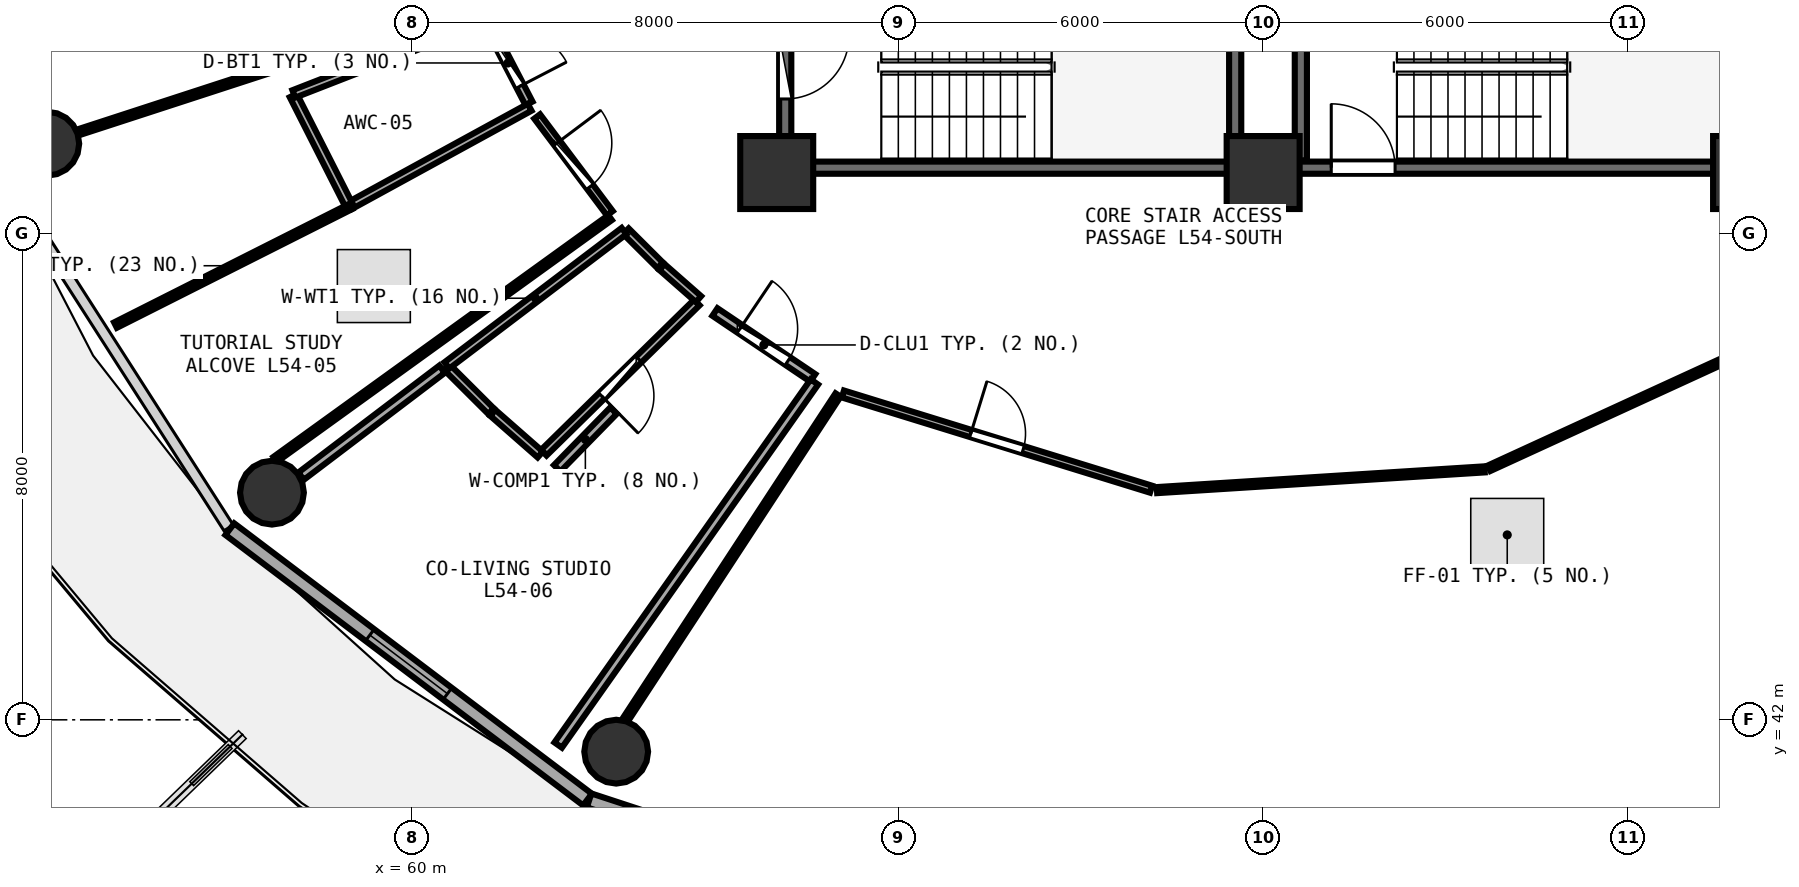
"""IFC4 building model, lengths in metres.
Left out: names, types, materials, properties, quantities, classifications, styles, units other than length and angle.
Written with IfcOpenShell. Run it as: python <this file> out.ifc"""

import sys

from ifc_helpers import new_model, si_unit, direction, frame, frame_2d, origin, origin_2d, place, context, subcontext, project, spatial, rectangle, circle, extrude, element, fill, save


model = new_model("IFC4")
c1 = context("Model", 3, precision=1e-05, world=origin(), true_north=direction((0.0, 1.0)))
c2 = subcontext(c1, "Body", "Model", "MODEL_VIEW")
j1 = project(units=[si_unit("LENGTHUNIT", "METRE"), si_unit("PLANEANGLEUNIT", "RADIAN")], contexts=[c1])
p1 = place(None, origin())
s1 = spatial("IfcSite", under=j1, at=p1, CompositionType="ELEMENT")
p2 = place(p1, origin())
s2 = spatial("IfcBuilding", under=s1, at=p2, CompositionType="ELEMENT")
p3 = place(p2, frame((0.0, 0.0, 211.95)))
s3 = spatial("IfcBuildingStorey", under=s2, at=p3, CompositionType="ELEMENT", Elevation=211.95)
for number, where, z_axis, x_axis in (
    (1, (66.0, 51.0, 0.0), (0.0, 0.0, 1.0), (1.0, 0.0, 0.0)),
    (2, (74.0, 51.0, 0.0), (0.0, 0.0, 1.0), (1.0, 0.0, 0.0)),
    (3, (82.0, 51.0, 0.0), (0.0, 0.0, 1.0), (1.0, 0.0, 0.0)),
):
    element("IfcColumn", number, at=place(p3, frame(where, z_axis=z_axis, x_axis=x_axis)), inside=s3, PredefinedType="PILASTER", context=c2, shape_type="SweptSolid", body=[
        extrude(rectangle(XDim=1.2, YDim=1.2, at=origin_2d()), origin(), (0.0, 0.0, 1.0), 3.75),
    ])
for number, where, z_axis, x_axis in (
    (4, (54.003, 51.474, 0.0), (0.0, 0.0, 1.0), (1.0, 0.0, 0.0)),
    (5, (57.698, 45.736, 0.0), (0.0, 0.0, 1.0), (1.0, 0.0, 0.0)),
    (6, (63.36, 41.476, 0.0), (0.0, 0.0, 1.0), (1.0, 0.0, 0.0)),
):
    element("IfcColumn", number, at=place(p3, frame(where, z_axis=z_axis, x_axis=x_axis)), inside=s3, PredefinedType="COLUMN", context=c2, shape_type="SweptSolid", body=[
        extrude(circle(Radius=0.525, at=origin_2d()), origin(), (0.0, 0.0, 1.0), 3.75),
    ])
p4 = place(p3, frame((57.006, 45.135, 0.0), z_axis=(0.0, 0.0, 1.0), x_axis=(0.797701674595, -0.603052268338, 0.0)))
e7 = element("IfcWall", 7, at=p4, inside=s3, PredefinedType="SOLIDWALL", context=c2, shape_type="SweptSolid", body=[
    extrude(rectangle(XDim=7.374, YDim=0.24, at=frame_2d((3.687, 0.0))), origin(), (0.0, 0.0, 1.0), 3.475),
])
p5 = place(p4, frame((2.887, 0.0, 0.85)))
e8 = element("IfcOpeningElement", 8, at=p5, cuts=e7, PredefinedType="OPENING", context=c2, shape_type="SweptSolid", body=[
    extrude(rectangle(XDim=1.6, YDim=1.45, at=frame_2d((0.8, 0.725))), frame((0.0, 0.13, 0.0), z_axis=(0.0, -1.0, 0.0), x_axis=(1.0, 0.0, 0.0)), (0.0, 0.0, 1.0), 0.26),
])
p6 = place(p3, frame((62.914, 40.675, 0.0), z_axis=(0.0, 0.0, 1.0), x_axis=(0.95022142767, -0.31157541366, 0.0)))
e9 = element("IfcWall", 9, at=p6, inside=s3, PredefinedType="SOLIDWALL", context=c2, shape_type="SweptSolid", body=[
    extrude(rectangle(XDim=7.594, YDim=0.24, at=frame_2d((3.797, 0.0))), origin(), (0.0, 0.0, 1.0), 3.475),
])
p7 = place(p6, frame((2.997, 0.0, 0.85)))
e10 = element("IfcOpeningElement", 10, at=p7, cuts=e9, PredefinedType="OPENING", context=c2, shape_type="SweptSolid", body=[
    extrude(rectangle(XDim=1.6, YDim=1.45, at=frame_2d((0.8, 0.725))), frame((0.0, 0.13, 0.0), z_axis=(0.0, -1.0, 0.0), x_axis=(1.0, 0.0, 0.0)), (0.0, 0.0, 1.0), 0.26),
])
p8 = place(p3, frame((74.0, 51.08, 0.0), z_axis=(0.0, 0.0, 1.0), x_axis=(1.0, 0.0, 0.0)))
e11 = element("IfcWall", 11, at=p8, inside=s3, PredefinedType="SHEAR", context=c2, shape_type="SweptSolid", body=[
    extrude(rectangle(XDim=7.9, YDim=0.2, at=frame_2d((3.95, 0.0))), origin(), (0.0, 0.0, 1.0), 3.49),
])
p9 = place(p8, frame((1.12, 0.0, 0.0)))
e12 = element("IfcOpeningElement", 12, at=p9, cuts=e11, PredefinedType="OPENING", context=c2, shape_type="SweptSolid", body=[
    extrude(rectangle(XDim=1.05, YDim=2.1, at=frame_2d((0.525, 1.05))), frame((0.0, 0.11, 0.0), z_axis=(0.0, -1.0, 0.0), x_axis=(1.0, 0.0, 0.0)), (0.0, 0.0, 1.0), 0.22),
])
p10 = place(p3, frame((74.62, 54.27, 0.0), z_axis=(0.0, 0.0, 1.0), x_axis=(0.0, -1.0, 0.0)))
e13 = element("IfcWall", 13, at=p10, inside=s3, PredefinedType="SHEAR", context=c2, shape_type="SweptSolid", body=[
    extrude(rectangle(XDim=3.07, YDim=0.2, at=frame_2d((1.535, 0.0))), origin(), (0.0, 0.0, 1.0), 3.49),
])
p11 = place(p3, frame((66.26, 51.08, 0.0), z_axis=(0.0, 0.0, 1.0), x_axis=(1.0, 0.0, 0.0)))
e14 = element("IfcWall", 14, at=p11, inside=s3, PredefinedType="SHEAR", context=c2, shape_type="SweptSolid", body=[
    extrude(rectangle(XDim=7.16, YDim=0.2, at=frame_2d((3.58, 0.0))), origin(), (0.0, 0.0, 1.0), 3.49),
])
p12 = place(p3, frame((73.54, 51.2, 0.0), z_axis=(0.0, 0.0, 1.0), x_axis=(0.0, 1.0, 0.0)))
e15 = element("IfcWall", 15, at=p12, inside=s3, PredefinedType="SHEAR", context=c2, shape_type="SweptSolid", body=[
    extrude(rectangle(XDim=3.07, YDim=0.2, at=frame_2d((1.535, 0.0))), origin(), (0.0, 0.0, 1.0), 3.49),
])
p13 = place(p3, frame((66.14, 54.27, 0.0), z_axis=(0.0, 0.0, 1.0), x_axis=(0.0, -1.0, 0.0)))
e16 = element("IfcWall", 16, at=p13, inside=s3, PredefinedType="SHEAR", context=c2, shape_type="SweptSolid", body=[
    extrude(rectangle(XDim=3.07, YDim=0.2, at=frame_2d((1.535, 0.0))), origin(), (0.0, 0.0, 1.0), 3.49),
])
p14 = place(p13, frame((1.01, 0.0, 0.0)))
e17 = element("IfcOpeningElement", 17, at=p14, cuts=e16, PredefinedType="OPENING", context=c2, shape_type="SweptSolid", body=[
    extrude(rectangle(XDim=1.05, YDim=2.1, at=frame_2d((0.525, 1.05))), frame((0.0, 0.11, 0.0), z_axis=(0.0, -1.0, 0.0), x_axis=(1.0, 0.0, 0.0)), (0.0, 0.0, 1.0), 0.22),
])
p15 = place(p3, frame((67.088, 47.358, 0.0), z_axis=(0.0, 0.0, 1.0), x_axis=(0.955451026591, -0.295149683696, 0.0)))
e18 = element("IfcWall", 18, at=p15, inside=s3, PredefinedType="PARTITIONING", context=c2, shape_type="SweptSolid", body=[
    extrude(rectangle(XDim=5.305, YDim=0.12, at=frame_2d((2.652, 0.0))), origin(), (0.0, 0.0, 1.0), 3.235),
])
p16 = place(p15, frame((2.202, 0.0, 0.0)))
e19 = element("IfcOpeningElement", 19, at=p16, cuts=e18, PredefinedType="OPENING", context=c2, shape_type="SweptSolid", body=[
    extrude(rectangle(XDim=0.9, YDim=2.08, at=frame_2d((0.45, 1.04))), frame((0.0, 0.07, 0.0), z_axis=(0.0, -1.0, 0.0), x_axis=(1.0, 0.0, 0.0)), (0.0, 0.0, 1.0), 0.14),
])
p17 = place(p3, frame((61.236, 53.468, 0.0), z_axis=(0.0, 0.0, 1.0), x_axis=(0.460573669508, -0.887621481802, 0.0)))
e20 = element("IfcWall", 20, at=p17, inside=s3, PredefinedType="PLUMBINGWALL", context=c2, shape_type="SweptSolid", body=[
    extrude(rectangle(XDim=1.5, YDim=0.13, at=frame_2d((0.75, 0.0))), origin(), (0.0, 0.0, 1.0), 3.235),
])
p18 = place(p17, frame((0.32, 0.0, 0.0)))
e21 = element("IfcOpeningElement", 21, at=p18, cuts=e20, PredefinedType="OPENING", context=c2, shape_type="SweptSolid", body=[
    extrude(rectangle(XDim=0.86, YDim=2.05, at=frame_2d((0.43, 1.025))), frame((0.0, 0.075, 0.0), z_axis=(0.0, -1.0, 0.0), x_axis=(1.0, 0.0, 0.0)), (0.0, 0.0, 1.0), 0.15),
])
p19 = place(p3, frame((62.06, 51.922, 0.0), z_axis=(0.0, 0.0, 1.0), x_axis=(0.600647163637, -0.799514218019, 0.0)))
e22 = element("IfcWall", 22, at=p19, inside=s3, PredefinedType="PARTITIONING", context=c2, shape_type="SweptSolid", body=[
    extrude(rectangle(XDim=1.991, YDim=0.12, at=frame_2d((0.996, 0.0))), origin(), (0.0, 0.0, 1.0), 3.025),
])
p20 = place(p19, frame((0.546, 0.0, 0.0)))
e23 = element("IfcOpeningElement", 23, at=p20, cuts=e22, PredefinedType="OPENING", context=c2, shape_type="SweptSolid", body=[
    extrude(rectangle(XDim=0.9, YDim=2.08, at=frame_2d((0.45, 1.04))), frame((0.0, 0.07, 0.0), z_axis=(0.0, -1.0, 0.0), x_axis=(1.0, 0.0, 0.0)), (0.0, 0.0, 1.0), 0.14),
])
p21 = place(p3, frame((64.686, 48.863, 0.0), z_axis=(0.0, 0.0, 1.0), x_axis=(-0.713685369918, -0.700466410875, 0.0)))
e24 = element("IfcWall", 24, at=p21, inside=s3, PredefinedType="PLUMBINGWALL", context=c2, shape_type="SweptSolid", body=[
    extrude(rectangle(XDim=3.528, YDim=0.13, at=frame_2d((1.764, 0.0))), origin(), (0.0, 0.0, 1.0), 3.175),
])
p22 = place(p21, frame((1.334, 0.0, 0.0)))
e25 = element("IfcOpeningElement", 25, at=p22, cuts=e24, PredefinedType="OPENING", context=c2, shape_type="SweptSolid", body=[
    extrude(rectangle(XDim=0.86, YDim=2.05, at=frame_2d((0.43, 1.025))), frame((0.0, 0.075, 0.0), z_axis=(0.0, -1.0, 0.0), x_axis=(1.0, 0.0, 0.0)), (0.0, 0.0, 1.0), 0.15),
])
p23 = place(p3, frame((64.984, 48.707, 0.0), z_axis=(0.0, 0.0, 1.0), x_axis=(0.829408373073, -0.558642775553, 0.0)))
e26 = element("IfcWall", 26, at=p23, inside=s3, PredefinedType="PARTITIONING", context=c2, shape_type="SweptSolid", body=[
    extrude(rectangle(XDim=1.94, YDim=0.15, at=frame_2d((0.97, 0.0))), origin(), (0.0, 0.0, 1.0), 3.025),
])
p24 = place(p23, frame((0.495, 0.0, 0.0)))
e27 = element("IfcOpeningElement", 27, at=p24, cuts=e26, PredefinedType="OPENING", context=c2, shape_type="SweptSolid", body=[
    extrude(rectangle(XDim=0.95, YDim=2.08, at=frame_2d((0.475, 1.04))), frame((0.0, 0.085, 0.0), z_axis=(0.0, -1.0, 0.0), x_axis=(1.0, 0.0, 0.0)), (0.0, 0.0, 1.0), 0.17),
])
p25 = place(p3, frame((72.254, 45.778, 0.0), z_axis=(0.0, 0.0, 1.0), x_axis=(0.99800477295, 0.063138523658, 0.0)))
e28 = element("IfcWall", 28, at=p25, inside=s3, PredefinedType="PARTITIONING", context=c2, shape_type="SweptSolid", body=[
    extrude(rectangle(XDim=5.398, YDim=0.1, at=frame_2d((2.699, 0.0))), origin(), (0.0, 0.0, 1.0), 3.025),
])
p26 = place(p3, frame((77.717, 46.138, 0.0), z_axis=(0.0, 0.0, 1.0), x_axis=(0.908908137454, 0.416996400069, 0.0)))
e29 = element("IfcWall", 29, at=p26, inside=s3, PredefinedType="PARTITIONING", context=c2, shape_type="SweptSolid", body=[
    extrude(rectangle(XDim=5.289, YDim=0.1, at=frame_2d((2.645, 0.0))), origin(), (0.0, 0.0, 1.0), 3.235),
])
p27 = place(p3, frame((63.514, 42.004, 0.0), z_axis=(0.0, 0.0, 1.0), x_axis=(0.547776057645, 0.836625000028, 0.0)))
e30 = element("IfcWall", 30, at=p27, inside=s3, PredefinedType="PARTITIONING", context=c2, shape_type="SweptSolid", body=[
    extrude(rectangle(XDim=6.381, YDim=0.1, at=frame_2d((3.19, 0.0))), origin(), (0.0, 0.0, 1.0), 3.025),
])
p28 = place(p3, frame((61.052, 53.791, 0.0), z_axis=(0.0, 0.0, 1.0), x_axis=(-0.950863645771, -0.309609959708, 0.0)))
e31 = element("IfcWall", 31, at=p28, inside=s3, PredefinedType="PARTITIONING", context=c2, shape_type="SweptSolid", body=[
    extrude(rectangle(XDim=6.87, YDim=0.1, at=frame_2d((3.435, 0.0))), origin(), (0.0, 0.0, 1.0), 3.175),
])
p29 = place(p3, frame((61.937, 52.073, 0.0), z_axis=(0.0, 0.0, 1.0), x_axis=(-0.877295143091, -0.479951280767, 0.0)))
e32 = element("IfcWall", 32, at=p29, inside=s3, PredefinedType="PLUMBINGWALL", context=c2, shape_type="SweptSolid", body=[
    extrude(rectangle(XDim=3.36, YDim=0.13, at=frame_2d((1.68, 0.0))), origin(), (0.0, 0.0, 1.0), 3.025),
])
p30 = place(p3, frame((58.962, 50.469, 0.0), z_axis=(0.0, 0.0, 1.0), x_axis=(-0.452384505313, 0.891822997771, 0.0)))
e33 = element("IfcWall", 33, at=p30, inside=s3, PredefinedType="PLUMBINGWALL", context=c2, shape_type="SweptSolid", body=[
    extrude(rectangle(XDim=2.018, YDim=0.13, at=frame_2d((1.009, 0.0))), origin(), (0.0, 0.0, 1.0), 3.025),
])
p31 = place(p3, frame((58.059, 52.293, 0.0), z_axis=(0.0, 0.0, 1.0), x_axis=(0.931712585556, 0.363196445352, 0.0)))
e34 = element("IfcWall", 34, at=p31, inside=s3, PredefinedType="PLUMBINGWALL", context=c2, shape_type="SweptSolid", body=[
    extrude(rectangle(XDim=3.36, YDim=0.13, at=frame_2d((1.68, 0.0))), origin(), (0.0, 0.0, 1.0), 3.175),
])
p32 = place(p3, frame((63.26, 50.259, 0.0), z_axis=(0.0, 0.0, 1.0), x_axis=(-0.810850730514, -0.585253016076, 0.0)))
e35 = element("IfcWall", 35, at=p32, inside=s3, PredefinedType="PARTITIONING", context=c2, shape_type="SweptSolid", body=[
    extrude(rectangle(XDim=6.793, YDim=0.1, at=frame_2d((3.396, 0.0))), origin(), (0.0, 0.0, 1.0), 3.175),
])
p33 = place(p3, frame((55.125, 48.491, 0.0), z_axis=(0.0, 0.0, 1.0), x_axis=(0.892902240534, 0.450250584507, 0.0)))
e36 = element("IfcWall", 36, at=p33, inside=s3, PredefinedType="PARTITIONING", context=c2, shape_type="SweptSolid", body=[
    extrude(rectangle(XDim=4.337, YDim=0.1, at=frame_2d((2.169, 0.0))), origin(), (0.0, 0.0, 1.0), 3.075),
])
p34 = place(p3, frame((63.519, 50.036, 0.0), z_axis=(0.0, 0.0, 1.0), x_axis=(0.708179895313, -0.706032036012, 0.0)))
e37 = element("IfcWall", 37, at=p34, inside=s3, PredefinedType="PLUMBINGWALL", context=c2, shape_type="SweptSolid", body=[
    extrude(rectangle(XDim=0.796, YDim=0.13, at=frame_2d((0.398, 0.0))), origin(), (0.0, 0.0, 1.0), 3.025),
])
p35 = place(p3, frame((64.112, 49.447, 0.0), z_axis=(0.0, 0.0, 1.0), x_axis=(0.751480759656, -0.659755005943, 0.0)))
e38 = element("IfcWall", 38, at=p35, inside=s3, PredefinedType="PLUMBINGWALL", context=c2, shape_type="SweptSolid", body=[
    extrude(rectangle(XDim=0.801, YDim=0.13, at=frame_2d((0.401, 0.0))), origin(), (0.0, 0.0, 1.0), 3.48),
])
p36 = place(p3, frame((62.111, 46.363, 0.0), z_axis=(0.0, 0.0, 1.0), x_axis=(-0.751599507382, 0.659619724162, 0.0)))
e39 = element("IfcWall", 39, at=p36, inside=s3, PredefinedType="PLUMBINGWALL", context=c2, shape_type="SweptSolid", body=[
    extrude(rectangle(XDim=1.038, YDim=0.13, at=frame_2d((0.519, 0.0))), origin(), (0.0, 0.0, 1.0), 3.48),
])
p37 = place(p3, frame((61.302, 47.075, 0.0), z_axis=(0.0, 0.0, 1.0), x_axis=(-0.707936648292, 0.706275938996, 0.0)))
e40 = element("IfcWall", 40, at=p37, inside=s3, PredefinedType="PLUMBINGWALL", context=c2, shape_type="SweptSolid", body=[
    extrude(rectangle(XDim=1.029, YDim=0.13, at=frame_2d((0.515, 0.0))), origin(), (0.0, 0.0, 1.0), 3.025),
])
p38 = place(p3, frame((60.575, 47.828, 0.0), z_axis=(0.0, 0.0, 1.0), x_axis=(0.79681650582, 0.604221363453, 0.0)))
e41 = element("IfcWall", 41, at=p38, inside=s3, PredefinedType="PLUMBINGWALL", context=c2, shape_type="SweptSolid", body=[
    extrude(rectangle(XDim=3.657, YDim=0.13, at=frame_2d((1.829, 0.0))), origin(), (0.0, 0.0, 1.0), 3.175),
])
p39 = place(p3, frame((66.62, 47.556, 0.0), z_axis=(0.0, 0.0, 1.0), x_axis=(-0.576552043051, -0.817060427174, 0.0)))
e42 = element("IfcWall", 42, at=p39, inside=s3, PredefinedType="PARTITIONING", context=c2, shape_type="SweptSolid", body=[
    extrude(rectangle(XDim=7.309, YDim=0.15, at=frame_2d((3.654, 0.0))), origin(), (0.0, 0.0, 1.0), 3.025),
])
p40 = place(p3, frame((58.177, 46.007, 0.0), z_axis=(0.0, 0.0, 1.0), x_axis=(0.796666201995, 0.604419525329, 0.0)))
e43 = element("IfcWall", 43, at=p40, inside=s3, PredefinedType="PARTITIONING", context=c2, shape_type="SweptSolid", body=[
    extrude(rectangle(XDim=2.911, YDim=0.15, at=frame_2d((1.455, 0.0))), origin(), (0.0, 0.0, 1.0), 3.025),
])
p41 = place(p3, frame((62.39, 46.137, 0.0), z_axis=(0.0, 0.0, 1.0), x_axis=(0.699044346204, 0.715078318816, 0.0)))
e44 = element("IfcWall", 44, at=p41, inside=s3, PredefinedType="PARTITIONING", context=c2, shape_type="SweptSolid", body=[
    extrude(rectangle(XDim=1.325, YDim=0.15, at=frame_2d((0.662, 0.0))), origin(), (0.0, 0.0, 1.0), 3.175),
])
p42 = place(p5, origin())
e45 = element("IfcWindow", 45, at=p42, inside=s3, PartitioningType="SINGLE_PANEL", PredefinedType="WINDOW", context=c2, shape_type="SweptSolid", body=[
    extrude(rectangle(XDim=1.6, YDim=1.45, at=frame_2d((0.8, 0.725))), frame((0.0, 0.03, 0.0), z_axis=(0.0, -1.0, 0.0), x_axis=(1.0, 0.0, 0.0)), (0.0, 0.0, 1.0), 0.06),
])
fill(e8, e45)
p43 = place(p9, origin())
e46 = element("IfcDoor", 46, at=p43, inside=s3, OperationType="SINGLE_SWING_LEFT", PredefinedType="DOOR", context=c2, shape_type="SweptSolid", body=[
    extrude(rectangle(XDim=1.05, YDim=2.1, at=frame_2d((0.525, 1.05))), frame((0.0, 0.025, 0.0), z_axis=(0.0, -1.0, 0.0), x_axis=(1.0, 0.0, 0.0)), (0.0, 0.0, 1.0), 0.05),
])
fill(e12, e46)
p44 = place(p14, origin())
e47 = element("IfcDoor", 47, at=p44, inside=s3, OperationType="SINGLE_SWING_LEFT", PredefinedType="DOOR", context=c2, shape_type="SweptSolid", body=[
    extrude(rectangle(XDim=1.05, YDim=2.1, at=frame_2d((0.525, 1.05))), frame((0.0, 0.025, 0.0), z_axis=(0.0, -1.0, 0.0), x_axis=(1.0, 0.0, 0.0)), (0.0, 0.0, 1.0), 0.05),
])
fill(e17, e47)
p45 = place(p16, origin())
e48 = element("IfcDoor", 48, at=p45, inside=s3, OperationType="SINGLE_SWING_LEFT", PredefinedType="DOOR", context=c2, shape_type="SweptSolid", body=[
    extrude(rectangle(XDim=0.9, YDim=2.08, at=frame_2d((0.45, 1.04))), frame((0.0, 0.025, 0.0), z_axis=(0.0, -1.0, 0.0), x_axis=(1.0, 0.0, 0.0)), (0.0, 0.0, 1.0), 0.05),
])
fill(e19, e48)
p46 = place(p18, origin())
e49 = element("IfcDoor", 49, at=p46, inside=s3, OperationType="SINGLE_SWING_RIGHT", PredefinedType="DOOR", context=c2, shape_type="SweptSolid", body=[
    extrude(rectangle(XDim=0.86, YDim=2.05, at=frame_2d((0.43, 1.025))), frame((0.0, 0.025, 0.0), z_axis=(0.0, -1.0, 0.0), x_axis=(1.0, 0.0, 0.0)), (0.0, 0.0, 1.0), 0.05),
])
fill(e21, e49)
p47 = place(p20, origin())
e50 = element("IfcDoor", 50, at=p47, inside=s3, OperationType="SINGLE_SWING_LEFT", PredefinedType="DOOR", context=c2, shape_type="SweptSolid", body=[
    extrude(rectangle(XDim=0.9, YDim=2.08, at=frame_2d((0.45, 1.04))), frame((0.0, 0.025, 0.0), z_axis=(0.0, -1.0, 0.0), x_axis=(1.0, 0.0, 0.0)), (0.0, 0.0, 1.0), 0.05),
])
fill(e23, e50)
p48 = place(p22, origin())
e51 = element("IfcDoor", 51, at=p48, inside=s3, OperationType="SINGLE_SWING_RIGHT", PredefinedType="DOOR", context=c2, shape_type="SweptSolid", body=[
    extrude(rectangle(XDim=0.86, YDim=2.05, at=frame_2d((0.43, 1.025))), frame((0.0, 0.025, 0.0), z_axis=(0.0, -1.0, 0.0), x_axis=(1.0, 0.0, 0.0)), (0.0, 0.0, 1.0), 0.05),
])
fill(e25, e51)
p49 = place(p24, origin())
e52 = element("IfcDoor", 52, at=p49, inside=s3, OperationType="SINGLE_SWING_LEFT", PredefinedType="DOOR", context=c2, shape_type="SweptSolid", body=[
    extrude(rectangle(XDim=0.95, YDim=2.08, at=frame_2d((0.475, 1.04))), frame((0.0, 0.025, 0.0), z_axis=(0.0, -1.0, 0.0), x_axis=(1.0, 0.0, 0.0)), (0.0, 0.0, 1.0), 0.05),
])
fill(e27, e52)
save(model, sys.argv[1])
